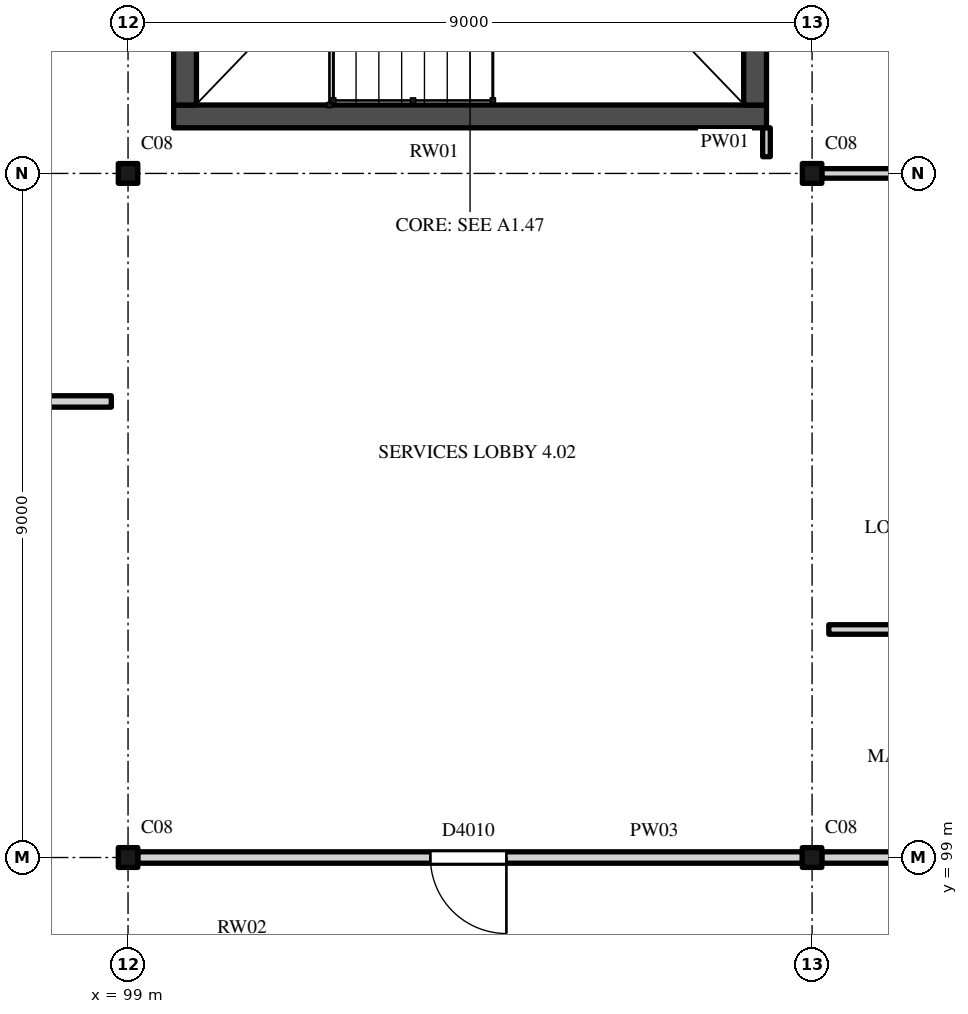
"""IFC4 building model, lengths in metres.
Left out: names, types, materials, properties, quantities, classifications, styles, units other than length and angle.
Written with IfcOpenShell. Run it as: python <this file> out.ifc"""

import sys

from ifc_helpers import new_model, si_unit, direction, frame, frame_2d, origin, origin_2d, place, context, subcontext, project, spatial, rectangle, i_section, extrude, element, fill, save


model = new_model("IFC4")
c1 = context("Model", 3, precision=1e-05, world=origin(), true_north=direction((0.0, 1.0)))
c2 = subcontext(c1, "Body", "Model", "MODEL_VIEW")
j1 = project(units=[si_unit("LENGTHUNIT", "METRE"), si_unit("PLANEANGLEUNIT", "RADIAN")], contexts=[c1])
p1 = place(None, origin())
s1 = spatial("IfcSite", under=j1, at=p1, CompositionType="ELEMENT")
p2 = place(p1, origin())
s2 = spatial("IfcBuilding", under=s1, at=p2, CompositionType="ELEMENT")
p3 = place(p2, frame((0.0, 0.0, 26.0)))
s3 = spatial("IfcBuildingStorey", under=s2, at=p3, CompositionType="ELEMENT", Elevation=26.0)
for number, where, z_axis, x_axis in (
    (1, (99.0, 99.0, 0.0), (0.0, 0.0, 1.0), (1.0, 0.0, 0.0)),
    (2, (108.0, 99.0, 0.0), (0.0, 0.0, 1.0), (1.0, 0.0, 0.0)),
    (3, (99.0, 108.0, 0.0), (0.0, 0.0, 1.0), (1.0, 0.0, 0.0)),
    (4, (108.0, 108.0, 0.0), (0.0, 0.0, 1.0), (1.0, 0.0, 0.0)),
):
    element("IfcColumn", number, at=place(p3, frame(where, z_axis=z_axis, x_axis=x_axis)), inside=s3, PredefinedType="COLUMN", context=c2, shape_type="SweptSolid", body=[
        extrude(i_section(OverallWidth=0.256, OverallDepth=0.26, WebThickness=0.01, FlangeThickness=0.017, FilletRadius=0.014, at=origin_2d()), origin(), (0.0, 0.0, 1.0), 5.0),
    ])
p4 = place(p3, frame((99.6, 108.75, 0.0), z_axis=(0.0, 0.0, 1.0), x_axis=(1.0, 0.0, 0.0)))
e5 = element("IfcWall", 5, at=p4, inside=s3, PredefinedType="SHEAR", context=c2, shape_type="SweptSolid", body=[
    extrude(rectangle(XDim=7.8, YDim=0.3, at=frame_2d((3.9, 0.0))), origin(), (0.0, 0.0, 1.0), 5.0),
])
p5 = place(p3, frame((99.75, 108.9, 0.0), z_axis=(0.0, 0.0, 1.0), x_axis=(0.0, 1.0, 0.0)))
e6 = element("IfcWall", 6, at=p5, inside=s3, PredefinedType="SHEAR", context=c2, shape_type="SweptSolid", body=[
    extrude(rectangle(XDim=7.8, YDim=0.3, at=frame_2d((3.9, 0.0))), origin(), (0.0, 0.0, 1.0), 5.0),
])
p6 = place(p5, frame((3.0, 0.0, 0.0)))
e7 = element("IfcOpeningElement", 7, at=p6, cuts=e6, PredefinedType="OPENING", context=c2, shape_type="SweptSolid", body=[
    extrude(rectangle(XDim=1.2, YDim=2.1, at=frame_2d((0.6, 1.05))), frame((0.0, 0.16, 0.0), z_axis=(0.0, -1.0, 0.0), x_axis=(1.0, 0.0, 0.0)), (0.0, 0.0, 1.0), 0.32),
])
p7 = place(p3, frame((107.25, 108.9, 0.0), z_axis=(0.0, 0.0, 1.0), x_axis=(0.0, 1.0, 0.0)))
e8 = element("IfcWall", 8, at=p7, inside=s3, PredefinedType="SHEAR", context=c2, shape_type="SweptSolid", body=[
    extrude(rectangle(XDim=7.8, YDim=0.3, at=frame_2d((3.9, 0.0))), origin(), (0.0, 0.0, 1.0), 5.0),
])
p8 = place(p3, frame((99.128, 99.0, 0.0), z_axis=(0.0, 0.0, 1.0), x_axis=(1.0, 0.0, 0.0)))
e9 = element("IfcWall", 9, at=p8, inside=s3, PredefinedType="PARTITIONING", context=c2, shape_type="SweptSolid", body=[
    extrude(rectangle(XDim=8.744, YDim=0.15, at=frame_2d((4.372, 0.0))), origin(), (0.0, 0.0, 1.0), 4.518),
])
p9 = place(p8, frame((3.85, 0.0, 0.0)))
e10 = element("IfcOpeningElement", 10, at=p9, cuts=e9, PredefinedType="OPENING", context=c2, shape_type="SweptSolid", body=[
    extrude(rectangle(XDim=1.0, YDim=2.4, at=frame_2d((0.5, 1.2))), frame((0.0, 0.085, 0.0), z_axis=(0.0, -1.0, 0.0), x_axis=(1.0, 0.0, 0.0)), (0.0, 0.0, 1.0), 0.17),
])
p10 = place(p3, frame((108.128, 99.0, 0.0), z_axis=(0.0, 0.0, 1.0), x_axis=(1.0, 0.0, 0.0)))
e11 = element("IfcWall", 11, at=p10, inside=s3, PredefinedType="PARTITIONING", context=c2, shape_type="SweptSolid", body=[
    extrude(rectangle(XDim=8.253, YDim=0.15, at=frame_2d((4.127, 0.0))), origin(), (0.0, 0.0, 1.0), 4.518),
])
p11 = place(p3, frame((108.22, 102.0, 0.0), z_axis=(0.0, 0.0, 1.0), x_axis=(1.0, 0.0, 0.0)))
e12 = element("IfcWall", 12, at=p11, inside=s3, PredefinedType="PARTITIONING", context=c2, shape_type="SweptSolid", body=[
    extrude(rectangle(XDim=8.161, YDim=0.125, at=frame_2d((4.081, 0.0))), origin(), (0.0, 0.0, 1.0), 4.521),
])
p12 = place(p11, frame((6.23, 0.0, 0.0)))
e13 = element("IfcOpeningElement", 13, at=p12, cuts=e12, PredefinedType="OPENING", context=c2, shape_type="SweptSolid", body=[
    extrude(rectangle(XDim=0.9, YDim=2.1, at=frame_2d((0.45, 1.05))), frame((0.0, 0.073, 0.0), z_axis=(0.0, -1.0, 0.0), x_axis=(1.0, 0.0, 0.0)), (0.0, 0.0, 1.0), 0.145),
])
p13 = place(p11, frame((2.15, 0.0, 0.0)))
e14 = element("IfcOpeningElement", 14, at=p13, cuts=e12, PredefinedType="OPENING", context=c2, shape_type="SweptSolid", body=[
    extrude(rectangle(XDim=0.9, YDim=2.1, at=frame_2d((0.45, 1.05))), frame((0.0, 0.073, 0.0), z_axis=(0.0, -1.0, 0.0), x_axis=(1.0, 0.0, 0.0)), (0.0, 0.0, 1.0), 0.145),
])
p14 = place(p3, frame((90.22, 105.0, 0.0), z_axis=(0.0, 0.0, 1.0), x_axis=(1.0, 0.0, 0.0)))
e15 = element("IfcWall", 15, at=p14, inside=s3, PredefinedType="PARTITIONING", context=c2, shape_type="SweptSolid", body=[
    extrude(rectangle(XDim=8.56, YDim=0.15, at=frame_2d((4.28, 0.0))), origin(), (0.0, 0.0, 1.0), 4.521),
])
p15 = place(p3, frame((108.128, 108.0, 0.0), z_axis=(0.0, 0.0, 1.0), x_axis=(1.0, 0.0, 0.0)))
e16 = element("IfcWall", 16, at=p15, inside=s3, PredefinedType="PARTITIONING", context=c2, shape_type="SweptSolid", body=[
    extrude(rectangle(XDim=8.253, YDim=0.125, at=frame_2d((4.127, 0.0))), origin(), (0.0, 0.0, 1.0), 4.518),
])
p16 = place(p15, frame((0.95, 0.0, 0.0)))
e17 = element("IfcOpeningElement", 17, at=p16, cuts=e16, PredefinedType="OPENING", context=c2, shape_type="SweptSolid", body=[
    extrude(rectangle(XDim=1.0, YDim=2.1, at=frame_2d((0.5, 1.05))), frame((0.0, 0.073, 0.0), z_axis=(0.0, -1.0, 0.0), x_axis=(1.0, 0.0, 0.0)), (0.0, 0.0, 1.0), 0.145),
])
p17 = place(p3, frame((107.4, 108.22, 0.0), z_axis=(0.0, 0.0, 1.0), x_axis=(0.0, 1.0, 0.0)))
e18 = element("IfcWall", 18, at=p17, inside=s3, PredefinedType="PARTITIONING", context=c2, shape_type="SweptSolid", body=[
    extrude(rectangle(XDim=0.38, YDim=0.1, at=frame_2d((0.19, 0.0))), origin(), (0.0, 0.0, 1.0), 4.825),
])
p18 = place(p9, origin())
e19 = element("IfcDoor", 19, at=p18, inside=s3, OperationType="SINGLE_SWING_RIGHT", PredefinedType="DOOR", context=c2, shape_type="SweptSolid", body=[
    extrude(rectangle(XDim=1.0, YDim=2.4, at=frame_2d((0.5, 1.2))), frame((0.0, 0.025, 0.0), z_axis=(0.0, -1.0, 0.0), x_axis=(1.0, 0.0, 0.0)), (0.0, 0.0, 1.0), 0.05),
])
fill(e10, e19)
save(model, sys.argv[1])
